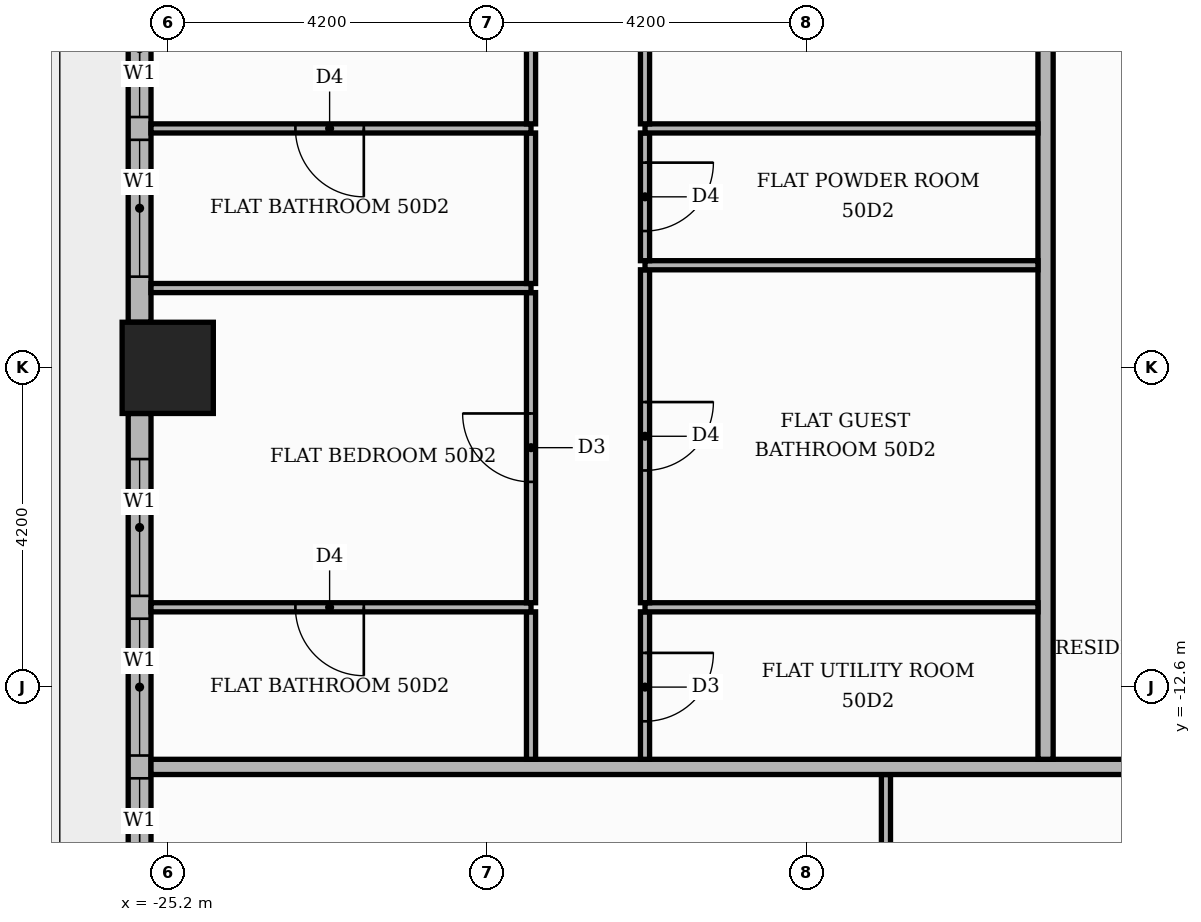
"""IFC4 building model, lengths in metres.
Left out: names, types, materials, properties, quantities, classifications, styles, units other than length and angle.
Written with IfcOpenShell. Run it as: python <this file> out.ifc"""

import sys

from ifc_helpers import new_model, si_unit, direction, frame, frame_2d, origin, origin_2d, place, context, subcontext, project, spatial, rectangle, extrude, element, fill, save


model = new_model("IFC4")
c1 = context("Model", 3, precision=1e-05, world=origin(), true_north=direction((0.0, 1.0)))
c2 = subcontext(c1, "Body", "Model", "MODEL_VIEW")
j1 = project(units=[si_unit("LENGTHUNIT", "METRE"), si_unit("PLANEANGLEUNIT", "RADIAN")], contexts=[c1])
p1 = place(None, origin())
s1 = spatial("IfcSite", under=j1, at=p1, CompositionType="ELEMENT")
p2 = place(p1, origin())
s2 = spatial("IfcBuilding", under=s1, at=p2, CompositionType="ELEMENT")
p3 = place(p2, frame((0.0, 0.0, 211.8)))
s3 = spatial("IfcBuildingStorey", under=s2, at=p3, CompositionType="ELEMENT", Elevation=211.8)
p4 = place(p3, frame((-25.2, -8.4, 0.0), z_axis=(0.0, 0.0, 1.0), x_axis=(1.0, 0.0, 0.0)))
e1 = element("IfcColumn", 1, at=p4, inside=s3, PredefinedType="COLUMN", context=c2, shape_type="SweptSolid", body=[
    extrude(rectangle(XDim=1.2, YDim=1.2, at=origin_2d()), origin(), (0.0, 0.0, 1.0), 3.9),
])
p5 = place(p3, frame((-25.57, -0.6, 0.0), z_axis=(0.0, 0.0, 1.0), x_axis=(0.0, -1.0, 0.0)))
e2 = element("IfcWall", 2, at=p5, inside=s3, PredefinedType="STANDARD", context=c2, shape_type="SweptSolid", body=[
    extrude(rectangle(XDim=7.2, YDim=0.3, at=frame_2d((3.6, 0.0))), origin(), (0.0, 0.0, 1.0), 3.48),
])
p6 = place(p5, frame((0.6, 0.0, 0.0)))
e3 = element("IfcOpeningElement", 3, at=p6, cuts=e2, PredefinedType="OPENING", context=c2, shape_type="SweptSolid", body=[
    extrude(rectangle(XDim=1.8, YDim=2.4, at=frame_2d((0.9, 1.2))), frame((0.0, 0.16, 0.0), z_axis=(0.0, -1.0, 0.0), x_axis=(1.0, 0.0, 0.0)), (0.0, 0.0, 1.0), 0.32),
])
p7 = place(p5, frame((2.7, 0.0, 0.9)))
e4 = element("IfcOpeningElement", 4, at=p7, cuts=e2, PredefinedType="OPENING", context=c2, shape_type="SweptSolid", body=[
    extrude(rectangle(XDim=1.8, YDim=2.1, at=frame_2d((0.9, 1.05))), frame((0.0, 0.16, 0.0), z_axis=(0.0, -1.0, 0.0), x_axis=(1.0, 0.0, 0.0)), (0.0, 0.0, 1.0), 0.32),
])
p8 = place(p5, frame((4.8, 0.0, 0.9)))
e5 = element("IfcOpeningElement", 5, at=p8, cuts=e2, PredefinedType="OPENING", context=c2, shape_type="SweptSolid", body=[
    extrude(rectangle(XDim=1.8, YDim=2.1, at=frame_2d((0.9, 1.05))), frame((0.0, 0.16, 0.0), z_axis=(0.0, -1.0, 0.0), x_axis=(1.0, 0.0, 0.0)), (0.0, 0.0, 1.0), 0.32),
])
p9 = place(p3, frame((-25.57, -9.0, 0.0), z_axis=(0.0, 0.0, 1.0), x_axis=(0.0, -1.0, 0.0)))
e6 = element("IfcWall", 6, at=p9, inside=s3, PredefinedType="STANDARD", context=c2, shape_type="SweptSolid", body=[
    extrude(rectangle(XDim=7.2, YDim=0.3, at=frame_2d((3.6, 0.0))), origin(), (0.0, 0.0, 1.0), 3.48),
])
p10 = place(p9, frame((0.6, 0.0, 0.9)))
e7 = element("IfcOpeningElement", 7, at=p10, cuts=e6, PredefinedType="OPENING", context=c2, shape_type="SweptSolid", body=[
    extrude(rectangle(XDim=1.8, YDim=2.1, at=frame_2d((0.9, 1.05))), frame((0.0, 0.16, 0.0), z_axis=(0.0, -1.0, 0.0), x_axis=(1.0, 0.0, 0.0)), (0.0, 0.0, 1.0), 0.32),
])
p11 = place(p9, frame((2.7, 0.0, 0.9)))
e8 = element("IfcOpeningElement", 8, at=p11, cuts=e6, PredefinedType="OPENING", context=c2, shape_type="SweptSolid", body=[
    extrude(rectangle(XDim=1.8, YDim=2.1, at=frame_2d((0.9, 1.05))), frame((0.0, 0.16, 0.0), z_axis=(0.0, -1.0, 0.0), x_axis=(1.0, 0.0, 0.0)), (0.0, 0.0, 1.0), 0.32),
])
p12 = place(p9, frame((4.8, 0.0, 0.9)))
e9 = element("IfcOpeningElement", 9, at=p12, cuts=e6, PredefinedType="OPENING", context=c2, shape_type="SweptSolid", body=[
    extrude(rectangle(XDim=1.8, YDim=2.1, at=frame_2d((0.9, 1.05))), frame((0.0, 0.16, 0.0), z_axis=(0.0, -1.0, 0.0), x_axis=(1.0, 0.0, 0.0)), (0.0, 0.0, 1.0), 0.32),
])
p13 = place(p3, frame((-15.75, -20.36, 0.0), z_axis=(0.0, 0.0, 1.0), x_axis=(0.0, 1.0, 0.0)))
e10 = element("IfcWall", 10, at=p13, inside=s3, PredefinedType="PARTITIONING", context=c2, shape_type="SweptSolid", body=[
    extrude(rectangle(XDim=6.61, YDim=0.12, at=frame_2d((3.305, 0.0))), origin(), (0.0, 0.0, 1.0), 3.48),
])
p14 = place(p13, frame((2.875, 0.0, 0.0)))
e11 = element("IfcOpeningElement", 11, at=p14, cuts=e10, PredefinedType="OPENING", context=c2, shape_type="SweptSolid", body=[
    extrude(rectangle(XDim=0.9, YDim=2.1, at=frame_2d((0.45, 1.05))), frame((0.0, 0.07, 0.0), z_axis=(0.0, -1.0, 0.0), x_axis=(1.0, 0.0, 0.0)), (0.0, 0.0, 1.0), 0.14),
])
p15 = place(p3, frame((-25.42, -13.65, 0.0), z_axis=(0.0, 0.0, 1.0), x_axis=(1.0, 0.0, 0.0)))
e12 = element("IfcWall", 12, at=p15, inside=s3, PredefinedType="PARTITIONING", context=c2, shape_type="SweptSolid", body=[
    extrude(rectangle(XDim=39.07, YDim=0.2, at=frame_2d((19.535, 0.0))), origin(), (0.0, 0.0, 1.0), 3.48),
])
p16 = place(p15, frame((13.32, 0.0, 0.0)))
e13 = element("IfcOpeningElement", 13, at=p16, cuts=e12, PredefinedType="OPENING", context=c2, shape_type="SweptSolid", body=[
    extrude(rectangle(XDim=1.1, YDim=2.4, at=frame_2d((0.55, 1.2))), frame((0.0, 0.11, 0.0), z_axis=(0.0, -1.0, 0.0), x_axis=(1.0, 0.0, 0.0)), (0.0, 0.0, 1.0), 0.22),
])
p17 = place(p3, frame((-20.42, -13.55, 0.0), z_axis=(0.0, 0.0, 1.0), x_axis=(0.0, 1.0, 0.0)))
e14 = element("IfcWall", 14, at=p17, inside=s3, PredefinedType="PARTITIONING", context=c2, shape_type="SweptSolid", body=[
    extrude(rectangle(XDim=1.94, YDim=0.12, at=frame_2d((0.97, 0.0))), origin(), (0.0, 0.0, 1.0), 3.48),
])
p18 = place(p3, frame((-18.92, -13.55, 0.0), z_axis=(0.0, 0.0, 1.0), x_axis=(0.0, 1.0, 0.0)))
e15 = element("IfcWall", 15, at=p18, inside=s3, PredefinedType="PARTITIONING", context=c2, shape_type="SweptSolid", body=[
    extrude(rectangle(XDim=1.94, YDim=0.12, at=frame_2d((0.97, 0.0))), origin(), (0.0, 0.0, 1.0), 3.48),
])
p19 = place(p18, frame((0.5, 0.0, 0.0)))
e16 = element("IfcOpeningElement", 16, at=p19, cuts=e15, PredefinedType="OPENING", context=c2, shape_type="SweptSolid", body=[
    extrude(rectangle(XDim=0.9, YDim=2.1, at=frame_2d((0.45, 1.05))), frame((0.0, 0.07, 0.0), z_axis=(0.0, -1.0, 0.0), x_axis=(1.0, 0.0, 0.0)), (0.0, 0.0, 1.0), 0.14),
])
p20 = place(p3, frame((-13.65, -13.55, 0.0), z_axis=(0.0, 0.0, 1.0), x_axis=(0.0, 1.0, 0.0)))
e17 = element("IfcWall", 17, at=p20, inside=s3, PredefinedType="PARTITIONING", context=c2, shape_type="SweptSolid", body=[
    extrude(rectangle(XDim=18.7, YDim=0.2, at=frame_2d((9.35, 0.0))), origin(), (0.0, 0.0, 1.0), 3.48),
])
p21 = place(p20, frame((16.15, 0.0, 0.0)))
e18 = element("IfcOpeningElement", 18, at=p21, cuts=e17, PredefinedType="OPENING", context=c2, shape_type="SweptSolid", body=[
    extrude(rectangle(XDim=1.1, YDim=2.4, at=frame_2d((0.55, 1.2))), frame((0.0, 0.11, 0.0), z_axis=(0.0, -1.0, 0.0), x_axis=(1.0, 0.0, 0.0)), (0.0, 0.0, 1.0), 0.22),
])
p22 = place(p3, frame((-25.42, -11.55, 0.0), z_axis=(0.0, 0.0, 1.0), x_axis=(1.0, 0.0, 0.0)))
e19 = element("IfcWall", 19, at=p22, inside=s3, PredefinedType="PARTITIONING", context=c2, shape_type="SweptSolid", body=[
    extrude(rectangle(XDim=5.0, YDim=0.12, at=frame_2d((2.5, 0.0))), origin(), (0.0, 0.0, 1.0), 3.48),
])
p23 = place(p22, frame((1.9, 0.0, 0.0)))
e20 = element("IfcOpeningElement", 20, at=p23, cuts=e19, PredefinedType="OPENING", context=c2, shape_type="SweptSolid", body=[
    extrude(rectangle(XDim=0.9, YDim=2.1, at=frame_2d((0.45, 1.05))), frame((0.0, 0.07, 0.0), z_axis=(0.0, -1.0, 0.0), x_axis=(1.0, 0.0, 0.0)), (0.0, 0.0, 1.0), 0.14),
])
p24 = place(p3, frame((-18.92, -11.55, 0.0), z_axis=(0.0, 0.0, 1.0), x_axis=(1.0, 0.0, 0.0)))
e21 = element("IfcWall", 21, at=p24, inside=s3, PredefinedType="PARTITIONING", context=c2, shape_type="SweptSolid", body=[
    extrude(rectangle(XDim=5.17, YDim=0.12, at=frame_2d((2.585, 0.0))), origin(), (0.0, 0.0, 1.0), 3.48),
])
p25 = place(p3, frame((-20.42, -11.49, 0.0), z_axis=(0.0, 0.0, 1.0), x_axis=(0.0, 1.0, 0.0)))
e22 = element("IfcWall", 22, at=p25, inside=s3, PredefinedType="PARTITIONING", context=c2, shape_type="SweptSolid", body=[
    extrude(rectangle(XDim=4.08, YDim=0.12, at=frame_2d((2.04, 0.0))), origin(), (0.0, 0.0, 1.0), 3.48),
])
p26 = place(p25, frame((1.59, 0.0, 0.0)))
e23 = element("IfcOpeningElement", 23, at=p26, cuts=e22, PredefinedType="OPENING", context=c2, shape_type="SweptSolid", body=[
    extrude(rectangle(XDim=0.9, YDim=2.1, at=frame_2d((0.45, 1.05))), frame((0.0, 0.07, 0.0), z_axis=(0.0, -1.0, 0.0), x_axis=(1.0, 0.0, 0.0)), (0.0, 0.0, 1.0), 0.14),
])
p27 = place(p3, frame((-18.92, -11.49, 0.0), z_axis=(0.0, 0.0, 1.0), x_axis=(0.0, 1.0, 0.0)))
e24 = element("IfcWall", 24, at=p27, inside=s3, PredefinedType="PARTITIONING", context=c2, shape_type="SweptSolid", body=[
    extrude(rectangle(XDim=4.38, YDim=0.12, at=frame_2d((2.19, 0.0))), origin(), (0.0, 0.0, 1.0), 3.48),
])
p28 = place(p27, frame((1.74, 0.0, 0.0)))
e25 = element("IfcOpeningElement", 25, at=p28, cuts=e24, PredefinedType="OPENING", context=c2, shape_type="SweptSolid", body=[
    extrude(rectangle(XDim=0.9, YDim=2.1, at=frame_2d((0.45, 1.05))), frame((0.0, 0.07, 0.0), z_axis=(0.0, -1.0, 0.0), x_axis=(1.0, 0.0, 0.0)), (0.0, 0.0, 1.0), 0.14),
])
p29 = place(p3, frame((-25.42, -7.35, 0.0), z_axis=(0.0, 0.0, 1.0), x_axis=(1.0, 0.0, 0.0)))
e26 = element("IfcWall", 26, at=p29, inside=s3, PredefinedType="PARTITIONING", context=c2, shape_type="SweptSolid", body=[
    extrude(rectangle(XDim=5.0, YDim=0.12, at=frame_2d((2.5, 0.0))), origin(), (0.0, 0.0, 1.0), 3.48),
])
p30 = place(p3, frame((-20.42, -7.29, 0.0), z_axis=(0.0, 0.0, 1.0), x_axis=(0.0, 1.0, 0.0)))
e27 = element("IfcWall", 27, at=p30, inside=s3, PredefinedType="PARTITIONING", context=c2, shape_type="SweptSolid", body=[
    extrude(rectangle(XDim=1.98, YDim=0.12, at=frame_2d((0.99, 0.0))), origin(), (0.0, 0.0, 1.0), 3.48),
])
p31 = place(p3, frame((-18.92, -7.05, 0.0), z_axis=(0.0, 0.0, 1.0), x_axis=(1.0, 0.0, 0.0)))
e28 = element("IfcWall", 28, at=p31, inside=s3, PredefinedType="PARTITIONING", context=c2, shape_type="SweptSolid", body=[
    extrude(rectangle(XDim=5.17, YDim=0.12, at=frame_2d((2.585, 0.0))), origin(), (0.0, 0.0, 1.0), 3.48),
])
p32 = place(p3, frame((-18.92, -6.99, 0.0), z_axis=(0.0, 0.0, 1.0), x_axis=(0.0, 1.0, 0.0)))
e29 = element("IfcWall", 29, at=p32, inside=s3, PredefinedType="PARTITIONING", context=c2, shape_type="SweptSolid", body=[
    extrude(rectangle(XDim=1.68, YDim=0.12, at=frame_2d((0.84, 0.0))), origin(), (0.0, 0.0, 1.0), 3.48),
])
p33 = place(p32, frame((0.39, 0.0, 0.0)))
e30 = element("IfcOpeningElement", 30, at=p33, cuts=e29, PredefinedType="OPENING", context=c2, shape_type="SweptSolid", body=[
    extrude(rectangle(XDim=0.9, YDim=2.1, at=frame_2d((0.45, 1.05))), frame((0.0, 0.07, 0.0), z_axis=(0.0, -1.0, 0.0), x_axis=(1.0, 0.0, 0.0)), (0.0, 0.0, 1.0), 0.14),
])
p34 = place(p3, frame((-25.42, -5.25, 0.0), z_axis=(0.0, 0.0, 1.0), x_axis=(1.0, 0.0, 0.0)))
e31 = element("IfcWall", 31, at=p34, inside=s3, PredefinedType="PARTITIONING", context=c2, shape_type="SweptSolid", body=[
    extrude(rectangle(XDim=5.0, YDim=0.12, at=frame_2d((2.5, 0.0))), origin(), (0.0, 0.0, 1.0), 3.48),
])
p35 = place(p34, frame((1.9, 0.0, 0.0)))
e32 = element("IfcOpeningElement", 32, at=p35, cuts=e31, PredefinedType="OPENING", context=c2, shape_type="SweptSolid", body=[
    extrude(rectangle(XDim=0.9, YDim=2.1, at=frame_2d((0.45, 1.05))), frame((0.0, 0.07, 0.0), z_axis=(0.0, -1.0, 0.0), x_axis=(1.0, 0.0, 0.0)), (0.0, 0.0, 1.0), 0.14),
])
p36 = place(p3, frame((-18.92, -5.25, 0.0), z_axis=(0.0, 0.0, 1.0), x_axis=(1.0, 0.0, 0.0)))
e33 = element("IfcWall", 33, at=p36, inside=s3, PredefinedType="PARTITIONING", context=c2, shape_type="SweptSolid", body=[
    extrude(rectangle(XDim=5.17, YDim=0.12, at=frame_2d((2.585, 0.0))), origin(), (0.0, 0.0, 1.0), 3.48),
])
p37 = place(p3, frame((-20.42, -5.19, 0.0), z_axis=(0.0, 0.0, 1.0), x_axis=(0.0, 1.0, 0.0)))
e34 = element("IfcWall", 34, at=p37, inside=s3, PredefinedType="PARTITIONING", context=c2, shape_type="SweptSolid", body=[
    extrude(rectangle(XDim=1.98, YDim=0.12, at=frame_2d((0.99, 0.0))), origin(), (0.0, 0.0, 1.0), 3.48),
])
p38 = place(p3, frame((-18.92, -5.19, 0.0), z_axis=(0.0, 0.0, 1.0), x_axis=(0.0, 1.0, 0.0)))
e35 = element("IfcWall", 35, at=p38, inside=s3, PredefinedType="PARTITIONING", context=c2, shape_type="SweptSolid", body=[
    extrude(rectangle(XDim=6.18, YDim=0.12, at=frame_2d((3.09, 0.0))), origin(), (0.0, 0.0, 1.0), 3.48),
])
p39 = place(p38, frame((2.64, 0.0, 0.0)))
e36 = element("IfcOpeningElement", 36, at=p39, cuts=e35, PredefinedType="OPENING", context=c2, shape_type="SweptSolid", body=[
    extrude(rectangle(XDim=0.9, YDim=2.1, at=frame_2d((0.45, 1.05))), frame((0.0, 0.07, 0.0), z_axis=(0.0, -1.0, 0.0), x_axis=(1.0, 0.0, 0.0)), (0.0, 0.0, 1.0), 0.14),
])
p40 = place(p7, origin())
e37 = element("IfcWindow", 37, at=p40, inside=s3, PartitioningType="SINGLE_PANEL", PredefinedType="WINDOW", context=c2, shape_type="SweptSolid", body=[
    extrude(rectangle(XDim=1.8, YDim=2.1, at=frame_2d((0.9, 1.05))), frame((0.0, 0.03, 0.0), z_axis=(0.0, -1.0, 0.0), x_axis=(1.0, 0.0, 0.0)), (0.0, 0.0, 1.0), 0.06),
])
fill(e4, e37)
p41 = place(p8, origin())
e38 = element("IfcWindow", 38, at=p41, inside=s3, PartitioningType="SINGLE_PANEL", PredefinedType="WINDOW", context=c2, shape_type="SweptSolid", body=[
    extrude(rectangle(XDim=1.8, YDim=2.1, at=frame_2d((0.9, 1.05))), frame((0.0, 0.03, 0.0), z_axis=(0.0, -1.0, 0.0), x_axis=(1.0, 0.0, 0.0)), (0.0, 0.0, 1.0), 0.06),
])
fill(e5, e38)
p42 = place(p10, origin())
e39 = element("IfcWindow", 39, at=p42, inside=s3, PartitioningType="SINGLE_PANEL", PredefinedType="WINDOW", context=c2, shape_type="SweptSolid", body=[
    extrude(rectangle(XDim=1.8, YDim=2.1, at=frame_2d((0.9, 1.05))), frame((0.0, 0.03, 0.0), z_axis=(0.0, -1.0, 0.0), x_axis=(1.0, 0.0, 0.0)), (0.0, 0.0, 1.0), 0.06),
])
fill(e7, e39)
p43 = place(p11, origin())
e40 = element("IfcWindow", 40, at=p43, inside=s3, PartitioningType="SINGLE_PANEL", PredefinedType="WINDOW", context=c2, shape_type="SweptSolid", body=[
    extrude(rectangle(XDim=1.8, YDim=2.1, at=frame_2d((0.9, 1.05))), frame((0.0, 0.03, 0.0), z_axis=(0.0, -1.0, 0.0), x_axis=(1.0, 0.0, 0.0)), (0.0, 0.0, 1.0), 0.06),
])
fill(e8, e40)
p44 = place(p12, origin())
e41 = element("IfcWindow", 41, at=p44, inside=s3, PartitioningType="SINGLE_PANEL", PredefinedType="WINDOW", context=c2, shape_type="SweptSolid", body=[
    extrude(rectangle(XDim=1.8, YDim=2.1, at=frame_2d((0.9, 1.05))), frame((0.0, 0.03, 0.0), z_axis=(0.0, -1.0, 0.0), x_axis=(1.0, 0.0, 0.0)), (0.0, 0.0, 1.0), 0.06),
])
fill(e9, e41)
p45 = place(p33, frame((0.9, 0.0, 0.0), z_axis=(0.0, 0.0, 1.0), x_axis=(-1.0, 0.0, 0.0)))
e42 = element("IfcDoor", 42, at=p45, inside=s3, OperationType="SINGLE_SWING_RIGHT", PredefinedType="DOOR", context=c2, shape_type="SweptSolid", body=[
    extrude(rectangle(XDim=0.9, YDim=2.1, at=frame_2d((0.45, 1.05))), frame((0.0, 0.025, 0.0), z_axis=(0.0, -1.0, 0.0), x_axis=(1.0, 0.0, 0.0)), (0.0, 0.0, 1.0), 0.05),
])
fill(e30, e42)
p46 = place(p28, frame((0.9, 0.0, 0.0), z_axis=(0.0, 0.0, 1.0), x_axis=(-1.0, 0.0, 0.0)))
e43 = element("IfcDoor", 43, at=p46, inside=s3, OperationType="SINGLE_SWING_RIGHT", PredefinedType="DOOR", context=c2, shape_type="SweptSolid", body=[
    extrude(rectangle(XDim=0.9, YDim=2.1, at=frame_2d((0.45, 1.05))), frame((0.0, 0.025, 0.0), z_axis=(0.0, -1.0, 0.0), x_axis=(1.0, 0.0, 0.0)), (0.0, 0.0, 1.0), 0.05),
])
fill(e25, e43)
p47 = place(p19, frame((0.9, 0.0, 0.0), z_axis=(0.0, 0.0, 1.0), x_axis=(-1.0, 0.0, 0.0)))
e44 = element("IfcDoor", 44, at=p47, inside=s3, OperationType="SINGLE_SWING_RIGHT", PredefinedType="DOOR", context=c2, shape_type="SweptSolid", body=[
    extrude(rectangle(XDim=0.9, YDim=2.1, at=frame_2d((0.45, 1.05))), frame((0.0, 0.025, 0.0), z_axis=(0.0, -1.0, 0.0), x_axis=(1.0, 0.0, 0.0)), (0.0, 0.0, 1.0), 0.05),
])
fill(e16, e44)
p48 = place(p35, frame((0.9, 0.0, 0.0), z_axis=(0.0, 0.0, 1.0), x_axis=(-1.0, 0.0, 0.0)))
e45 = element("IfcDoor", 45, at=p48, inside=s3, OperationType="SINGLE_SWING_RIGHT", PredefinedType="DOOR", context=c2, shape_type="SweptSolid", body=[
    extrude(rectangle(XDim=0.9, YDim=2.1, at=frame_2d((0.45, 1.05))), frame((0.0, 0.025, 0.0), z_axis=(0.0, -1.0, 0.0), x_axis=(1.0, 0.0, 0.0)), (0.0, 0.0, 1.0), 0.05),
])
fill(e32, e45)
p49 = place(p26, origin())
e46 = element("IfcDoor", 46, at=p49, inside=s3, OperationType="SINGLE_SWING_RIGHT", PredefinedType="DOOR", context=c2, shape_type="SweptSolid", body=[
    extrude(rectangle(XDim=0.9, YDim=2.1, at=frame_2d((0.45, 1.05))), frame((0.0, 0.025, 0.0), z_axis=(0.0, -1.0, 0.0), x_axis=(1.0, 0.0, 0.0)), (0.0, 0.0, 1.0), 0.05),
])
fill(e23, e46)
p50 = place(p23, frame((0.9, 0.0, 0.0), z_axis=(0.0, 0.0, 1.0), x_axis=(-1.0, 0.0, 0.0)))
e47 = element("IfcDoor", 47, at=p50, inside=s3, OperationType="SINGLE_SWING_RIGHT", PredefinedType="DOOR", context=c2, shape_type="SweptSolid", body=[
    extrude(rectangle(XDim=0.9, YDim=2.1, at=frame_2d((0.45, 1.05))), frame((0.0, 0.025, 0.0), z_axis=(0.0, -1.0, 0.0), x_axis=(1.0, 0.0, 0.0)), (0.0, 0.0, 1.0), 0.05),
])
fill(e20, e47)
save(model, sys.argv[1])
